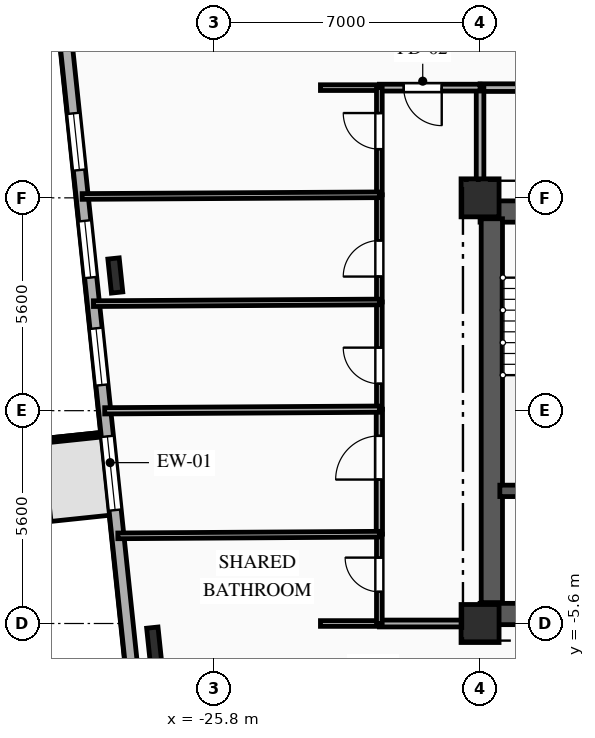
"""IFC4 building model, lengths in metres.
Left out: names, types, materials, properties, quantities, classifications, styles, units other than length and angle.
Written with IfcOpenShell. Run it as: python <this file> out.ifc"""

import sys

from ifc_helpers import new_model, si_unit, direction, frame, frame_2d, origin, origin_2d, place, context, subcontext, project, spatial, rectangle, i_section, extrude, element, fill, save


model = new_model("IFC4")
c1 = context("Model", 3, precision=1e-05, world=origin(), true_north=direction((0.0, 1.0)))
c2 = subcontext(c1, "Body", "Model", "MODEL_VIEW")
j1 = project(units=[si_unit("LENGTHUNIT", "METRE"), si_unit("PLANEANGLEUNIT", "RADIAN")], contexts=[c1])
p1 = place(None, origin())
s1 = spatial("IfcSite", under=j1, at=p1, CompositionType="ELEMENT")
p2 = place(p1, origin())
s2 = spatial("IfcBuilding", under=s1, at=p2, CompositionType="ELEMENT")
p3 = place(p2, frame((0.0, 0.0, 89.05)))
s3 = spatial("IfcBuildingStorey", under=s2, at=p3, CompositionType="ELEMENT", Elevation=89.05)
for number, where, z_axis, x_axis in (
    (1, (-18.8, -5.6, 0.0), (0.0, 0.0, 1.0), (1.0, 0.0, 0.0)),
    (2, (-18.8, 5.6, 0.0), (0.0, 0.0, 1.0), (1.0, 0.0, 0.0)),
):
    element("IfcColumn", number, at=place(p3, frame(where, z_axis=z_axis, x_axis=x_axis)), inside=s3, PredefinedType="COLUMN", context=c2, shape_type="SweptSolid", body=[
        extrude(rectangle(XDim=1.0, YDim=1.0, at=origin_2d()), origin(), (0.0, 0.0, 1.0), 3.35),
    ])
for number, where, z_axis, x_axis in (
    (3, (-28.398, 3.557, 0.0), (0.0, 0.0, 1.0), (0.995, 0.105, 0.0)),
    (4, (-27.377, -6.156, 0.0), (0.0, 0.0, 1.0), (0.995, 0.105, 0.0)),
):
    element("IfcColumn", number, at=place(p3, frame(where, z_axis=z_axis, x_axis=x_axis)), inside=s3, PredefinedType="COLUMN", context=c2, shape_type="SweptSolid", body=[
        extrude(i_section(OverallWidth=0.3, OverallDepth=0.9, WebThickness=0.019, FlangeThickness=0.035, FilletRadius=0.03, at=origin_2d()), origin(), (0.0, 0.0, 1.0), 3.35),
    ])
p4 = place(p3, frame((-26.935, -16.583, 0.0), z_axis=(0.0, 0.0, 1.0), x_axis=(-0.104524887486, 0.994522271192, 0.0)))
e5 = element("IfcWall", 5, at=p4, inside=s3, PredefinedType="SOLIDWALL", context=c2, shape_type="SweptSolid", body=[
    extrude(rectangle(XDim=30.6, YDim=0.32, at=frame_2d((15.3, 0.0))), origin(), (0.0, 0.0, 1.0), 3.045),
])
p5 = place(p4, frame((14.045, 0.0, 0.85)))
e6 = element("IfcOpeningElement", 6, at=p5, cuts=e5, PredefinedType="OPENING", context=c2, shape_type="SweptSolid", body=[
    extrude(rectangle(XDim=1.95, YDim=1.85, at=frame_2d((0.975, 0.925))), frame((0.0, 0.17, 0.0), z_axis=(0.0, -1.0, 0.0), x_axis=(1.0, 0.0, 0.0)), (0.0, 0.0, 1.0), 0.34),
])
p6 = place(p4, frame((17.354, 0.0, 0.85)))
e7 = element("IfcOpeningElement", 7, at=p6, cuts=e5, PredefinedType="OPENING", context=c2, shape_type="SweptSolid", body=[
    extrude(rectangle(XDim=1.5, YDim=1.85, at=frame_2d((0.75, 0.925))), frame((0.0, 0.17, 0.0), z_axis=(0.0, -1.0, 0.0), x_axis=(1.0, 0.0, 0.0)), (0.0, 0.0, 1.0), 0.34),
])
p7 = place(p4, frame((20.198, 0.0, 0.85)))
e8 = element("IfcOpeningElement", 8, at=p7, cuts=e5, PredefinedType="OPENING", context=c2, shape_type="SweptSolid", body=[
    extrude(rectangle(XDim=1.5, YDim=1.85, at=frame_2d((0.75, 0.925))), frame((0.0, 0.17, 0.0), z_axis=(0.0, -1.0, 0.0), x_axis=(1.0, 0.0, 0.0)), (0.0, 0.0, 1.0), 0.34),
])
p8 = place(p4, frame((23.041, 0.0, 0.85)))
e9 = element("IfcOpeningElement", 9, at=p8, cuts=e5, PredefinedType="OPENING", context=c2, shape_type="SweptSolid", body=[
    extrude(rectangle(XDim=1.5, YDim=1.85, at=frame_2d((0.75, 0.925))), frame((0.0, 0.17, 0.0), z_axis=(0.0, -1.0, 0.0), x_axis=(1.0, 0.0, 0.0)), (0.0, 0.0, 1.0), 0.34),
])
p9 = place(p3, frame((-18.8, 5.24, 0.0), z_axis=(0.0, 0.0, 1.0), x_axis=(1.0, 0.0, 0.0)))
e10 = element("IfcWall", 10, at=p9, inside=s3, PredefinedType="SHEAR", context=c2, shape_type="SweptSolid", body=[
    extrude(rectangle(XDim=9.6, YDim=0.56, at=frame_2d((4.8, 0.0))), origin(), (0.0, 0.0, 1.0), 3.045),
])
p10 = place(p9, frame((1.55, 0.0, 0.0)))
e11 = element("IfcOpeningElement", 11, at=p10, cuts=e10, PredefinedType="OPENING", context=c2, shape_type="SweptSolid", body=[
    extrude(rectangle(XDim=1.1, YDim=2.15, at=frame_2d((0.55, 1.075))), frame((0.0, 0.29, 0.0), z_axis=(0.0, -1.0, 0.0), x_axis=(1.0, 0.0, 0.0)), (0.0, 0.0, 1.0), 0.58),
])
p11 = place(p9, frame((4.775, 0.0, 0.0)))
e12 = element("IfcOpeningElement", 12, at=p11, cuts=e10, PredefinedType="OPENING", context=c2, shape_type="SweptSolid", body=[
    extrude(rectangle(XDim=1.05, YDim=2.1, at=frame_2d((0.525, 1.05))), frame((0.0, 0.29, 0.0), z_axis=(0.0, -1.0, 0.0), x_axis=(1.0, 0.0, 0.0)), (0.0, 0.0, 1.0), 0.58),
])
p12 = place(p3, frame((-18.8, -5.35, 0.0), z_axis=(0.0, 0.0, 1.0), x_axis=(1.0, 0.0, 0.0)))
e13 = element("IfcWall", 13, at=p12, inside=s3, PredefinedType="SHEAR", context=c2, shape_type="SweptSolid", body=[
    extrude(rectangle(XDim=9.6, YDim=0.56, at=frame_2d((4.8, 0.0))), origin(), (0.0, 0.0, 1.0), 3.045),
])
p13 = place(p12, frame((1.05, 0.0, 0.0)))
e14 = element("IfcOpeningElement", 14, at=p13, cuts=e13, PredefinedType="OPENING", context=c2, shape_type="SweptSolid", body=[
    extrude(rectangle(XDim=0.9, YDim=2.1, at=frame_2d((0.45, 1.05))), frame((0.0, 0.29, 0.0), z_axis=(0.0, -1.0, 0.0), x_axis=(1.0, 0.0, 0.0)), (0.0, 0.0, 1.0), 0.58),
])
p14 = place(p3, frame((-18.49, -5.05, 0.0), z_axis=(0.0, 0.0, 1.0), x_axis=(0.0, 1.0, 0.0)))
e15 = element("IfcWall", 15, at=p14, inside=s3, PredefinedType="SHEAR", context=c2, shape_type="SweptSolid", body=[
    extrude(rectangle(XDim=10.1, YDim=0.56, at=frame_2d((5.05, 0.0))), origin(), (0.0, 0.0, 1.0), 3.045),
])
p15 = place(p3, frame((-18.28, -2.11, 0.0), z_axis=(0.0, 0.0, 1.0), x_axis=(1.0, 0.0, 0.0)))
e16 = element("IfcWall", 16, at=p15, inside=s3, PredefinedType="SHEAR", context=c2, shape_type="SweptSolid", body=[
    extrude(rectangle(XDim=3.18, YDim=0.3, at=frame_2d((1.59, 0.0))), origin(), (0.0, 0.0, 1.0), 3.045),
])
p16 = place(p3, frame((-12.0, 8.5, 0.0), z_axis=(0.0, 0.0, 1.0), x_axis=(-1.0, 0.0, 0.0)))
e17 = element("IfcWall", 17, at=p16, inside=s3, PredefinedType="PARTITIONING", context=c2, shape_type="SweptSolid", body=[
    extrude(rectangle(XDim=6.8, YDim=0.2, at=frame_2d((3.4, 0.0))), origin(), (0.0, 0.0, 1.0), 3.045),
])
p17 = place(p16, frame((1.715, 0.0, 0.0)))
e18 = element("IfcOpeningElement", 18, at=p17, cuts=e17, PredefinedType="OPENING", context=c2, shape_type="SweptSolid", body=[
    extrude(rectangle(XDim=1.1, YDim=2.15, at=frame_2d((0.55, 1.075))), frame((0.0, 0.11, 0.0), z_axis=(0.0, -1.0, 0.0), x_axis=(1.0, 0.0, 0.0)), (0.0, 0.0, 1.0), 0.22),
])
p18 = place(p3, frame((-18.8, 8.5, 0.0), z_axis=(0.0, 0.0, 1.0), x_axis=(0.0, -1.0, 0.0)))
e19 = element("IfcWall", 19, at=p18, inside=s3, PredefinedType="PARTITIONING", context=c2, shape_type="SweptSolid", body=[
    extrude(rectangle(XDim=2.9, YDim=0.2, at=frame_2d((1.45, 0.0))), origin(), (0.0, 0.0, 1.0), 2.53),
])
p19 = place(p3, frame((-18.8, 8.5, 0.0), z_axis=(0.0, 0.0, 1.0), x_axis=(-1.0, 0.0, 0.0)))
e20 = element("IfcWall", 20, at=p19, inside=s3, PredefinedType="PARTITIONING", context=c2, shape_type="SweptSolid", body=[
    extrude(rectangle(XDim=2.65, YDim=0.18, at=frame_2d((1.325, 0.0))), origin(), (0.0, 0.0, 1.0), 3.045),
])
p20 = place(p19, frame((1.009, 0.0, 0.0)))
e21 = element("IfcOpeningElement", 21, at=p20, cuts=e20, PredefinedType="OPENING", context=c2, shape_type="SweptSolid", body=[
    extrude(rectangle(XDim=1.0, YDim=2.15, at=frame_2d((0.5, 1.075))), frame((0.0, 0.1, 0.0), z_axis=(0.0, -1.0, 0.0), x_axis=(1.0, 0.0, 0.0)), (0.0, 0.0, 1.0), 0.2),
])
p21 = place(p3, frame((-21.45, 8.5, 0.0), z_axis=(0.0, 0.0, 1.0), x_axis=(-1.0, 0.0, 0.0)))
e22 = element("IfcWall", 22, at=p21, inside=s3, PredefinedType="PARTITIONING", context=c2, shape_type="SweptSolid", body=[
    extrude(rectangle(XDim=1.55, YDim=0.15, at=frame_2d((0.775, 0.0))), origin(), (0.0, 0.0, 1.0), 3.045),
])
p22 = place(p3, frame((-21.45, -5.6, 0.0), z_axis=(0.0, 0.0, 1.0), x_axis=(1.0, 0.0, 0.0)))
e23 = element("IfcWall", 23, at=p22, inside=s3, PredefinedType="PARTITIONING", context=c2, shape_type="SweptSolid", body=[
    extrude(rectangle(XDim=2.65, YDim=0.18, at=frame_2d((1.325, 0.0))), origin(), (0.0, 0.0, 1.0), 3.045),
])
p23 = place(p3, frame((-23.0, -5.6, 0.0), z_axis=(0.0, 0.0, 1.0), x_axis=(1.0, 0.0, 0.0)))
e24 = element("IfcWall", 24, at=p23, inside=s3, PredefinedType="PLUMBINGWALL", context=c2, shape_type="SweptSolid", body=[
    extrude(rectangle(XDim=1.55, YDim=0.15, at=frame_2d((0.775, 0.0))), origin(), (0.0, 0.0, 1.0), 3.045),
])
p24 = place(p3, frame((-21.45, -5.6, 0.0), z_axis=(0.0, 0.0, 1.0), x_axis=(0.0, 1.0, 0.0)))
e25 = element("IfcWall", 25, at=p24, inside=s3, PredefinedType="PLUMBINGWALL", context=c2, shape_type="SweptSolid", body=[
    extrude(rectangle(XDim=2.35, YDim=0.15, at=frame_2d((1.175, 0.0))), origin(), (0.0, 0.0, 1.0), 3.045),
])
p25 = place(p24, frame((0.834, 0.0, 0.0)))
e26 = element("IfcOpeningElement", 26, at=p25, cuts=e25, PredefinedType="OPENING", context=c2, shape_type="SweptSolid", body=[
    extrude(rectangle(XDim=0.9, YDim=2.1, at=frame_2d((0.45, 1.05))), frame((0.0, 0.085, 0.0), z_axis=(0.0, -1.0, 0.0), x_axis=(1.0, 0.0, 0.0)), (0.0, 0.0, 1.0), 0.17),
])
p26 = place(p3, frame((-21.45, -3.25, 0.0), z_axis=(0.0, 0.0, 1.0), x_axis=(0.0, 1.0, 0.0)))
e27 = element("IfcWall", 27, at=p26, inside=s3, PredefinedType="PARTITIONING", context=c2, shape_type="SweptSolid", body=[
    extrude(rectangle(XDim=3.29, YDim=0.165, at=frame_2d((1.645, 0.0))), origin(), (0.0, 0.0, 1.0), 3.045),
])
p27 = place(p26, frame((1.438, 0.0, 0.0)))
e28 = element("IfcOpeningElement", 28, at=p27, cuts=e27, PredefinedType="OPENING", context=c2, shape_type="SweptSolid", body=[
    extrude(rectangle(XDim=1.15, YDim=2.15, at=frame_2d((0.575, 1.075))), frame((0.0, 0.093, 0.0), z_axis=(0.0, -1.0, 0.0), x_axis=(1.0, 0.0, 0.0)), (0.0, 0.0, 1.0), 0.185),
])
p28 = place(p3, frame((-21.45, 0.04, 0.0), z_axis=(0.0, 0.0, 1.0), x_axis=(0.0, 1.0, 0.0)))
e29 = element("IfcWall", 29, at=p28, inside=s3, PredefinedType="PARTITIONING", context=c2, shape_type="SweptSolid", body=[
    extrude(rectangle(XDim=2.82, YDim=0.15, at=frame_2d((1.41, 0.0))), origin(), (0.0, 0.0, 1.0), 3.045),
])
p29 = place(p28, frame((0.669, 0.0, 0.0)))
e30 = element("IfcOpeningElement", 30, at=p29, cuts=e29, PredefinedType="OPENING", context=c2, shape_type="SweptSolid", body=[
    extrude(rectangle(XDim=0.95, YDim=2.1, at=frame_2d((0.475, 1.05))), frame((0.0, 0.085, 0.0), z_axis=(0.0, -1.0, 0.0), x_axis=(1.0, 0.0, 0.0)), (0.0, 0.0, 1.0), 0.17),
])
p30 = place(p3, frame((-21.45, 2.86, 0.0), z_axis=(0.0, 0.0, 1.0), x_axis=(0.0, 1.0, 0.0)))
e31 = element("IfcWall", 31, at=p30, inside=s3, PredefinedType="PARTITIONING", context=c2, shape_type="SweptSolid", body=[
    extrude(rectangle(XDim=2.82, YDim=0.15, at=frame_2d((1.41, 0.0))), origin(), (0.0, 0.0, 1.0), 3.045),
])
p31 = place(p30, frame((0.669, 0.0, 0.0)))
e32 = element("IfcOpeningElement", 32, at=p31, cuts=e31, PredefinedType="OPENING", context=c2, shape_type="SweptSolid", body=[
    extrude(rectangle(XDim=0.95, YDim=2.1, at=frame_2d((0.475, 1.05))), frame((0.0, 0.085, 0.0), z_axis=(0.0, -1.0, 0.0), x_axis=(1.0, 0.0, 0.0)), (0.0, 0.0, 1.0), 0.17),
])
p32 = place(p3, frame((-21.45, 5.68, 0.0), z_axis=(0.0, 0.0, 1.0), x_axis=(0.0, 1.0, 0.0)))
e33 = element("IfcWall", 33, at=p32, inside=s3, PredefinedType="PARTITIONING", context=c2, shape_type="SweptSolid", body=[
    extrude(rectangle(XDim=2.82, YDim=0.15, at=frame_2d((1.41, 0.0))), origin(), (0.0, 0.0, 1.0), 3.045),
])
p33 = place(p32, frame((1.201, 0.0, 0.0)))
e34 = element("IfcOpeningElement", 34, at=p33, cuts=e33, PredefinedType="OPENING", context=c2, shape_type="SweptSolid", body=[
    extrude(rectangle(XDim=0.95, YDim=2.1, at=frame_2d((0.475, 1.05))), frame((0.0, 0.085, 0.0), z_axis=(0.0, -1.0, 0.0), x_axis=(1.0, 0.0, 0.0)), (0.0, 0.0, 1.0), 0.17),
])
p34 = place(p3, frame((-28.332, -3.294, 0.0), z_axis=(0.0, 0.0, 1.0), x_axis=(0.99997961062, 0.006385792383, 0.0)))
e35 = element("IfcWall", 35, at=p34, inside=s3, PredefinedType="PLUMBINGWALL", context=c2, shape_type="SweptSolid", body=[
    extrude(rectangle(XDim=6.882, YDim=0.15, at=frame_2d((3.441, 0.0))), origin(), (0.0, 0.0, 1.0), 3.045),
])
p35 = place(p3, frame((-28.677, -0.004, 0.0), z_axis=(0.0, 0.0, 1.0), x_axis=(0.999981514486, 0.006080352417, 0.0)))
e36 = element("IfcWall", 36, at=p35, inside=s3, PredefinedType="PARTITIONING", context=c2, shape_type="SweptSolid", body=[
    extrude(rectangle(XDim=7.228, YDim=0.165, at=frame_2d((3.614, 0.0))), origin(), (0.0, 0.0, 1.0), 3.045),
])
p36 = place(p3, frame((-28.974, 2.816, 0.0), z_axis=(0.0, 0.0, 1.0), x_axis=(0.999982942193, 0.00584083232, 0.0)))
e37 = element("IfcWall", 37, at=p36, inside=s3, PredefinedType="PARTITIONING", context=c2, shape_type="SweptSolid", body=[
    extrude(rectangle(XDim=7.524, YDim=0.15, at=frame_2d((3.762, 0.0))), origin(), (0.0, 0.0, 1.0), 2.53),
])
p37 = place(p3, frame((-29.27, 5.636, 0.0), z_axis=(0.0, 0.0, 1.0), x_axis=(0.999984210669, 0.005619467326, 0.0)))
e38 = element("IfcWall", 38, at=p37, inside=s3, PredefinedType="PARTITIONING", context=c2, shape_type="SweptSolid", body=[
    extrude(rectangle(XDim=7.82, YDim=0.15, at=frame_2d((3.91, 0.0))), origin(), (0.0, 0.0, 1.0), 3.045),
])
p38 = place(p5, origin())
e39 = element("IfcWindow", 39, at=p38, inside=s3, PartitioningType="SINGLE_PANEL", PredefinedType="WINDOW", context=c2, shape_type="SweptSolid", body=[
    extrude(rectangle(XDim=1.95, YDim=1.85, at=frame_2d((0.975, 0.925))), frame((0.0, 0.03, 0.0), z_axis=(0.0, -1.0, 0.0), x_axis=(1.0, 0.0, 0.0)), (0.0, 0.0, 1.0), 0.06),
])
fill(e6, e39)
p39 = place(p6, origin())
e40 = element("IfcWindow", 40, at=p39, inside=s3, PartitioningType="SINGLE_PANEL", PredefinedType="WINDOW", context=c2, shape_type="SweptSolid", body=[
    extrude(rectangle(XDim=1.5, YDim=1.85, at=frame_2d((0.75, 0.925))), frame((0.0, 0.03, 0.0), z_axis=(0.0, -1.0, 0.0), x_axis=(1.0, 0.0, 0.0)), (0.0, 0.0, 1.0), 0.06),
])
fill(e7, e40)
p40 = place(p7, origin())
e41 = element("IfcWindow", 41, at=p40, inside=s3, PartitioningType="SINGLE_PANEL", PredefinedType="WINDOW", context=c2, shape_type="SweptSolid", body=[
    extrude(rectangle(XDim=1.5, YDim=1.85, at=frame_2d((0.75, 0.925))), frame((0.0, 0.03, 0.0), z_axis=(0.0, -1.0, 0.0), x_axis=(1.0, 0.0, 0.0)), (0.0, 0.0, 1.0), 0.06),
])
fill(e8, e41)
p41 = place(p8, origin())
e42 = element("IfcWindow", 42, at=p41, inside=s3, PartitioningType="SINGLE_PANEL", PredefinedType="WINDOW", context=c2, shape_type="SweptSolid", body=[
    extrude(rectangle(XDim=1.5, YDim=1.85, at=frame_2d((0.75, 0.925))), frame((0.0, 0.03, 0.0), z_axis=(0.0, -1.0, 0.0), x_axis=(1.0, 0.0, 0.0)), (0.0, 0.0, 1.0), 0.06),
])
fill(e9, e42)
p42 = place(p20, origin())
e43 = element("IfcDoor", 43, at=p42, inside=s3, OperationType="SINGLE_SWING_LEFT", PredefinedType="DOOR", context=c2, shape_type="SweptSolid", body=[
    extrude(rectangle(XDim=1.0, YDim=2.15, at=frame_2d((0.5, 1.075))), frame((0.0, 0.025, 0.0), z_axis=(0.0, -1.0, 0.0), x_axis=(1.0, 0.0, 0.0)), (0.0, 0.0, 1.0), 0.05),
])
fill(e21, e43)
p43 = place(p25, origin())
e44 = element("IfcDoor", 44, at=p43, inside=s3, OperationType="SINGLE_SWING_RIGHT", PredefinedType="DOOR", context=c2, shape_type="SweptSolid", body=[
    extrude(rectangle(XDim=0.9, YDim=2.1, at=frame_2d((0.45, 1.05))), frame((0.0, 0.025, 0.0), z_axis=(0.0, -1.0, 0.0), x_axis=(1.0, 0.0, 0.0)), (0.0, 0.0, 1.0), 0.05),
])
fill(e26, e44)
p44 = place(p27, origin())
e45 = element("IfcDoor", 45, at=p44, inside=s3, OperationType="SINGLE_SWING_LEFT", PredefinedType="DOOR", context=c2, shape_type="SweptSolid", body=[
    extrude(rectangle(XDim=1.15, YDim=2.15, at=frame_2d((0.575, 1.075))), frame((0.0, 0.025, 0.0), z_axis=(0.0, -1.0, 0.0), x_axis=(1.0, 0.0, 0.0)), (0.0, 0.0, 1.0), 0.05),
])
fill(e28, e45)
p45 = place(p29, origin())
e46 = element("IfcDoor", 46, at=p45, inside=s3, OperationType="SINGLE_SWING_RIGHT", PredefinedType="DOOR", context=c2, shape_type="SweptSolid", body=[
    extrude(rectangle(XDim=0.95, YDim=2.1, at=frame_2d((0.475, 1.05))), frame((0.0, 0.025, 0.0), z_axis=(0.0, -1.0, 0.0), x_axis=(1.0, 0.0, 0.0)), (0.0, 0.0, 1.0), 0.05),
])
fill(e30, e46)
p46 = place(p31, origin())
e47 = element("IfcDoor", 47, at=p46, inside=s3, OperationType="SINGLE_SWING_LEFT", PredefinedType="DOOR", context=c2, shape_type="SweptSolid", body=[
    extrude(rectangle(XDim=0.95, YDim=2.1, at=frame_2d((0.475, 1.05))), frame((0.0, 0.025, 0.0), z_axis=(0.0, -1.0, 0.0), x_axis=(1.0, 0.0, 0.0)), (0.0, 0.0, 1.0), 0.05),
])
fill(e32, e47)
p47 = place(p33, origin())
e48 = element("IfcDoor", 48, at=p47, inside=s3, OperationType="SINGLE_SWING_RIGHT", PredefinedType="DOOR", context=c2, shape_type="SweptSolid", body=[
    extrude(rectangle(XDim=0.95, YDim=2.1, at=frame_2d((0.475, 1.05))), frame((0.0, 0.025, 0.0), z_axis=(0.0, -1.0, 0.0), x_axis=(1.0, 0.0, 0.0)), (0.0, 0.0, 1.0), 0.05),
])
fill(e34, e48)
save(model, sys.argv[1])
